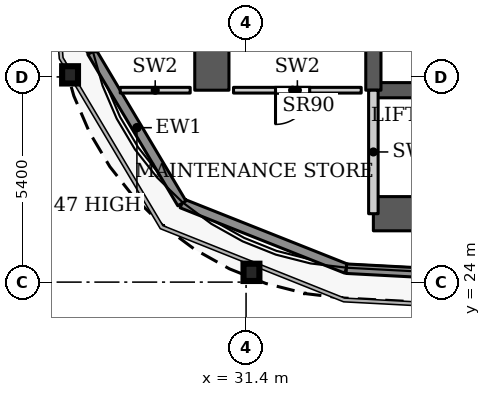
"""IFC4 building model, lengths in metres.
Left out: names, types, materials, properties, quantities, classifications, styles, units other than length and angle.
Written with IfcOpenShell. Run it as: python <this file> out.ifc"""

import sys

from ifc_helpers import new_model, si_unit, direction, frame, frame_2d, origin, origin_2d, place, context, subcontext, project, spatial, rectangle, i_section, extrude, source, transform, mapped, element, fill, save


model = new_model("IFC4")
c1 = context("Model", 3, precision=1e-05, world=origin(), true_north=direction((0.0, 1.0)))
c2 = subcontext(c1, "Body", "Model", "MODEL_VIEW")
j1 = project(units=[si_unit("LENGTHUNIT", "METRE"), si_unit("PLANEANGLEUNIT", "RADIAN")], contexts=[c1])
p1 = place(None, origin())
s1 = spatial("IfcSite", under=j1, at=p1, CompositionType="ELEMENT")
p2 = place(p1, origin())
s2 = spatial("IfcBuilding", under=s1, at=p2, CompositionType="ELEMENT")
p3 = place(p2, frame((0.0, 0.0, 137.0)))
s3 = spatial("IfcBuildingStorey", under=s2, at=p3, CompositionType="ELEMENT", Elevation=137.0)
for number, where, z_axis, x_axis in (
    (1, (31.542, 24.257, 0.0), (0.0, 0.0, 1.0), (1.0, 0.0, 0.0)),
    (2, (26.769, 29.454, 0.0), (0.0, 0.0, 1.0), (1.0, 0.0, 0.0)),
):
    element("IfcColumn", number, at=place(p3, frame(where, z_axis=z_axis, x_axis=x_axis)), inside=s3, PredefinedType="COLUMN", context=c2, shape_type="SweptSolid", body=[
        extrude(i_section(OverallWidth=0.418, OverallDepth=0.455, WebThickness=0.042, FlangeThickness=0.068, FilletRadius=0.014, at=origin_2d()), origin(), (0.0, 0.0, 1.0), 3.9),
    ])
p4 = place(p3, frame((34.75, 25.8, 0.0), z_axis=(0.0, 0.0, 1.0), x_axis=(1.0, 0.0, 0.0)))
e3 = element("IfcWall", 3, at=p4, inside=s3, PredefinedType="SHEAR", context=c2, shape_type="SweptSolid", body=[
    extrude(rectangle(XDim=18.4, YDim=0.9, at=frame_2d((9.2, 0.0))), origin(), (0.0, 0.0, 1.0), 3.9),
])
p5 = place(p3, frame((34.75, 29.05, 0.0), z_axis=(0.0, 0.0, 1.0), x_axis=(1.0, 0.0, 0.0)))
e4 = element("IfcWall", 4, at=p5, inside=s3, PredefinedType="SHEAR", context=c2, shape_type="SweptSolid", body=[
    extrude(rectangle(XDim=18.4, YDim=0.4, at=frame_2d((9.2, 0.0))), origin(), (0.0, 0.0, 1.0), 3.9),
])
p6 = place(p5, frame((15.125, 0.0, 0.0)))
e5 = element("IfcOpeningElement", 5, at=p6, cuts=e4, PredefinedType="OPENING", context=c2, shape_type="SweptSolid", body=[
    extrude(rectangle(XDim=1.1, YDim=2.2, at=frame_2d((0.55, 1.1))), frame((0.0, 0.21, 0.0), z_axis=(0.0, -1.0, 0.0), x_axis=(1.0, 0.0, 0.0)), (0.0, 0.0, 1.0), 0.42),
])
p7 = place(p3, frame((34.75, 29.05, 0.0), z_axis=(0.0, 0.0, 1.0), x_axis=(0.0, 1.0, 0.0)))
e6 = element("IfcWall", 6, at=p7, inside=s3, PredefinedType="SHEAR", context=c2, shape_type="SweptSolid", body=[
    extrude(rectangle(XDim=18.45, YDim=0.4, at=frame_2d((9.225, 0.0))), origin(), (0.0, 0.0, 1.0), 3.9),
])
p8 = place(p7, frame((8.025, 0.0, 0.0)))
e7 = element("IfcOpeningElement", 7, at=p8, cuts=e6, PredefinedType="OPENING", context=c2, shape_type="SweptSolid", body=[
    extrude(rectangle(XDim=1.1, YDim=2.2, at=frame_2d((0.55, 1.1))), frame((0.0, 0.21, 0.0), z_axis=(0.0, -1.0, 0.0), x_axis=(1.0, 0.0, 0.0)), (0.0, 0.0, 1.0), 0.42),
])
p9 = place(p7, frame((10.875, 0.0, 0.0)))
e8 = element("IfcOpeningElement", 8, at=p9, cuts=e6, PredefinedType="OPENING", context=c2, shape_type="SweptSolid", body=[
    extrude(rectangle(XDim=1.1, YDim=2.2, at=frame_2d((0.55, 1.1))), frame((0.0, 0.21, 0.0), z_axis=(0.0, -1.0, 0.0), x_axis=(1.0, 0.0, 0.0)), (0.0, 0.0, 1.0), 0.42),
])
p10 = place(p7, frame((13.725, 0.0, 0.0)))
e9 = element("IfcOpeningElement", 9, at=p10, cuts=e6, PredefinedType="OPENING", context=c2, shape_type="SweptSolid", body=[
    extrude(rectangle(XDim=1.1, YDim=2.2, at=frame_2d((0.55, 1.1))), frame((0.0, 0.21, 0.0), z_axis=(0.0, -1.0, 0.0), x_axis=(1.0, 0.0, 0.0)), (0.0, 0.0, 1.0), 0.42),
])
p11 = place(p7, frame((15.95, 0.0, 0.0)))
e10 = element("IfcOpeningElement", 10, at=p11, cuts=e6, PredefinedType="OPENING", context=c2, shape_type="SweptSolid", body=[
    extrude(rectangle(XDim=1.1, YDim=2.2, at=frame_2d((0.55, 1.1))), frame((0.0, 0.21, 0.0), z_axis=(0.0, -1.0, 0.0), x_axis=(1.0, 0.0, 0.0)), (0.0, 0.0, 1.0), 0.42),
])
p12 = place(p3, frame((30.5, 29.05, 0.0), z_axis=(0.0, 0.0, 1.0), x_axis=(0.0, 1.0, 0.0)))
e11 = element("IfcWall", 11, at=p12, inside=s3, PredefinedType="SHEAR", context=c2, shape_type="SweptSolid", body=[
    extrude(rectangle(XDim=18.45, YDim=0.9, at=frame_2d((9.225, 0.0))), origin(), (0.0, 0.0, 1.0), 3.9),
])
p13 = place(p12, frame((1.5, 0.0, 0.0)))
e12 = element("IfcOpeningElement", 12, at=p13, cuts=e11, PredefinedType="OPENING", context=c2, shape_type="SweptSolid", body=[
    extrude(rectangle(XDim=0.9, YDim=2.2, at=frame_2d((0.45, 1.1))), frame((0.0, 0.46, 0.0), z_axis=(0.0, -1.0, 0.0), x_axis=(1.0, 0.0, 0.0)), (0.0, 0.0, 1.0), 0.92),
])
p14 = place(p12, frame((7.406, 0.0, 0.0)))
e13 = element("IfcOpeningElement", 13, at=p14, cuts=e11, PredefinedType="OPENING", context=c2, shape_type="SweptSolid", body=[
    extrude(rectangle(XDim=0.9, YDim=2.2, at=frame_2d((0.45, 1.1))), frame((0.0, 0.46, 0.0), z_axis=(0.0, -1.0, 0.0), x_axis=(1.0, 0.0, 0.0)), (0.0, 0.0, 1.0), 0.92),
])
p15 = place(p12, frame((11.688, 0.0, 0.0)))
e14 = element("IfcOpeningElement", 14, at=p15, cuts=e11, PredefinedType="OPENING", context=c2, shape_type="SweptSolid", body=[
    extrude(rectangle(XDim=0.9, YDim=2.2, at=frame_2d((0.45, 1.1))), frame((0.0, 0.46, 0.0), z_axis=(0.0, -1.0, 0.0), x_axis=(1.0, 0.0, 0.0)), (0.0, 0.0, 1.0), 0.92),
])
p16 = place(p3, frame((34.039, 24.353, 0.0), z_axis=(0.0, 0.0, 1.0), x_axis=(-0.929352825399, 0.369192803184, 0.0)))
e15 = element("IfcWall", 15, at=p16, inside=s3, PredefinedType="SOLIDWALL", context=c2, shape_type="SweptSolid", body=[
    extrude(rectangle(XDim=4.656, YDim=0.25, at=frame_2d((2.328, 0.0))), origin(), (0.0, 0.0, 1.0), 3.75),
])
p17 = place(p3, frame((29.712, 26.072, 0.0), z_axis=(0.0, 0.0, 1.0), x_axis=(-0.511028049012, 0.859564036662, 0.0)))
e16 = element("IfcWall", 16, at=p17, inside=s3, PredefinedType="SOLIDWALL", context=c2, shape_type="SweptSolid", body=[
    extrude(rectangle(XDim=4.634, YDim=0.25, at=frame_2d((2.317, 0.0))), origin(), (0.0, 0.0, 1.0), 3.147),
])
p18 = place(p3, frame((27.344, 30.055, 0.0), z_axis=(0.0, 0.0, 1.0), x_axis=(-0.077571675317, 0.99698677784, 0.0)))
e17 = element("IfcWall", 17, at=p18, inside=s3, PredefinedType="SOLIDWALL", context=c2, shape_type="SweptSolid", body=[
    extrude(rectangle(XDim=1.92, YDim=0.25, at=frame_2d((0.96, 0.0))), origin(), (0.0, 0.0, 1.0), 3.75),
])
p19 = place(p3, frame((100.586, 20.85, 0.0), z_axis=(0.0, 0.0, 1.0), x_axis=(-0.99861746497, 0.052565755559, 0.0)))
e18 = element("IfcWall", 18, at=p19, inside=s3, PredefinedType="SOLIDWALL", context=c2, shape_type="SweptSolid", body=[
    extrude(rectangle(XDim=66.639, YDim=0.25, at=frame_2d((33.319, 0.0))), origin(), (0.0, 0.0, 1.0), 3.75),
])
p20 = place(p3, frame((34.75, 25.8, 0.0), z_axis=(0.0, 0.0, 1.0), x_axis=(0.0, 1.0, 0.0)))
e19 = element("IfcWall", 19, at=p20, inside=s3, PredefinedType="PARTITIONING", context=c2, shape_type="SweptSolid", body=[
    extrude(rectangle(XDim=3.25, YDim=0.25, at=frame_2d((1.625, 0.0))), origin(), (0.0, 0.0, 1.0), 3.9),
])
p21 = place(p3, frame((28.089, 29.05, 0.0), z_axis=(0.0, 0.0, 1.0), x_axis=(1.0, 0.0, 0.0)))
e20 = element("IfcWall", 20, at=p21, inside=s3, PredefinedType="PARTITIONING", context=c2, shape_type="SweptSolid", body=[
    extrude(rectangle(XDim=1.841, YDim=0.15, at=frame_2d((0.92, 0.0))), origin(), (0.0, 0.0, 1.0), 3.9),
])
p22 = place(p3, frame((31.07, 29.05, 0.0), z_axis=(0.0, 0.0, 1.0), x_axis=(1.0, 0.0, 0.0)))
e21 = element("IfcWall", 21, at=p22, inside=s3, PredefinedType="PARTITIONING", context=c2, shape_type="SweptSolid", body=[
    extrude(rectangle(XDim=3.36, YDim=0.15, at=frame_2d((1.68, 0.0))), origin(), (0.0, 0.0, 1.0), 3.9),
])
p23 = place(p22, frame((1.105, 0.0, 0.0)))
e22 = element("IfcOpeningElement", 22, at=p23, cuts=e21, PredefinedType="OPENING", context=c2, shape_type="SweptSolid", body=[
    extrude(rectangle(XDim=0.9, YDim=2.2, at=frame_2d((0.45, 1.1))), frame((0.0, 0.085, 0.0), z_axis=(0.0, -1.0, 0.0), x_axis=(1.0, 0.0, 0.0)), (0.0, 0.0, 1.0), 0.17),
])
m1 = source(origin(), c2, "Body", "SweptSolid", [
    extrude(rectangle(XDim=0.9, YDim=2.2, at=frame_2d((0.45, 1.1))), frame((0.0, 0.025, 0.0), z_axis=(0.0, -1.0, 0.0), x_axis=(1.0, 0.0, 0.0)), (0.0, 0.0, 1.0), 0.05),
])
p24 = place(p23, origin())
e23 = element("IfcDoor", 23, at=p24, inside=s3, OperationType="SINGLE_SWING_RIGHT", PredefinedType="DOOR", context=c2, shape_type="MappedRepresentation", body=[
    mapped(m1, transform((0.0, 0.0, 0.0), x_axis=(1.0, 0.0, 0.0), y_axis=(0.0, 1.0, 0.0), z_axis=(0.0, 0.0, 1.0), scale=1.0)),
])
fill(e22, e23)
save(model, sys.argv[1])
